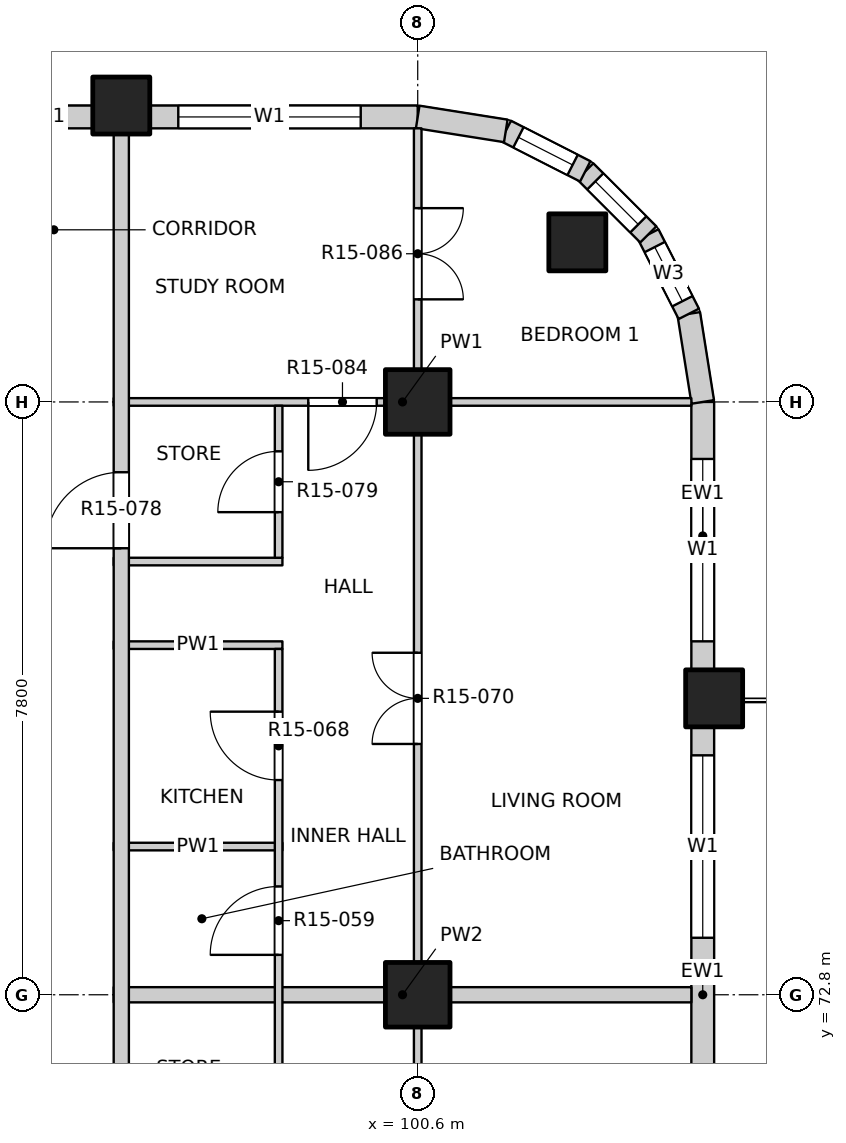
"""IFC4 building model, lengths in metres.
Left out: names, types, materials, properties, quantities, classifications, styles, units other than length and angle.
Written with IfcOpenShell. Run it as: python <this file> out.ifc"""

import sys

from ifc_helpers import new_model, si_unit, direction, frame, frame_2d, origin, origin_2d, place, context, subcontext, project, spatial, rectangle, extrude, element, fill, save


model = new_model("IFC4")
c1 = context("Model", 3, precision=1e-05, world=origin(), true_north=direction((0.0, 1.0)))
c2 = subcontext(c1, "Body", "Model", "MODEL_VIEW")
j1 = project(units=[si_unit("LENGTHUNIT", "METRE"), si_unit("PLANEANGLEUNIT", "RADIAN")], contexts=[c1])
p1 = place(None, origin())
s1 = spatial("IfcSite", under=j1, at=p1, CompositionType="ELEMENT")
p2 = place(p1, origin())
s2 = spatial("IfcBuilding", under=s1, at=p2, CompositionType="ELEMENT")
p3 = place(p2, frame((0.0, 0.0, 158.8)))
s3 = spatial("IfcBuildingStorey", under=s2, at=p3, CompositionType="ELEMENT", Elevation=158.8)
for number, where, z_axis, x_axis in (
    (1, (102.7, 82.7, -0.25), (0.0, 0.0, 1.0), (1.0, 0.0, 0.0)),
    (2, (104.5, 76.7, -0.25), (0.0, 0.0, 1.0), (1.0, 0.0, 0.0)),
    (3, (96.7, 84.5, -0.25), (0.0, 0.0, 1.0), (1.0, 0.0, 0.0)),
):
    element("IfcColumn", number, at=place(p3, frame(where, z_axis=z_axis, x_axis=x_axis)), inside=s3, PredefinedType="COLUMN", context=c2, shape_type="SweptSolid", body=[
        extrude(rectangle(XDim=0.75, YDim=0.75, at=origin_2d()), origin(), (0.0, 0.0, 1.0), 3.4),
    ])
for number, where, z_axis, x_axis in (
    (4, (100.6, 72.8, -0.25), (0.0, 0.0, 1.0), (1.0, 0.0, 0.0)),
    (5, (100.6, 80.6, -0.25), (0.0, 0.0, 1.0), (1.0, 0.0, 0.0)),
):
    element("IfcColumn", number, at=place(p3, frame(where, z_axis=z_axis, x_axis=x_axis)), inside=s3, PredefinedType="COLUMN", context=c2, shape_type="SweptSolid", body=[
        extrude(rectangle(XDim=0.85, YDim=0.85, at=origin_2d()), origin(), (0.0, 0.0, 1.0), 3.4),
    ])
p4 = place(p3, frame((104.35, 69.275, 0.0), z_axis=(0.0, 0.0, 1.0), x_axis=(0.0, 1.0, 0.0)))
e6 = element("IfcWall", 6, at=p4, inside=s3, PredefinedType="SOLIDWALL", context=c2, shape_type="SweptSolid", body=[
    extrude(rectangle(XDim=7.05, YDim=0.3, at=frame_2d((3.525, 0.0))), origin(), (0.0, 0.0, 1.0), 2.7),
])
p5 = place(p4, frame((0.675, 0.0, 0.0)))
e7 = element("IfcOpeningElement", 7, at=p5, cuts=e6, PredefinedType="OPENING", context=c2, shape_type="SweptSolid", body=[
    extrude(rectangle(XDim=1.8, YDim=2.4, at=frame_2d((0.9, 1.2))), frame((0.0, 0.16, 0.0), z_axis=(0.0, -1.0, 0.0), x_axis=(1.0, 0.0, 0.0)), (0.0, 0.0, 1.0), 0.32),
])
p6 = place(p4, frame((4.275, 0.0, 0.9)))
e8 = element("IfcOpeningElement", 8, at=p6, cuts=e6, PredefinedType="OPENING", context=c2, shape_type="SweptSolid", body=[
    extrude(rectangle(XDim=2.4, YDim=1.8, at=frame_2d((1.2, 0.9))), frame((0.0, 0.16, 0.0), z_axis=(0.0, -1.0, 0.0), x_axis=(1.0, 0.0, 0.0)), (0.0, 0.0, 1.0), 0.32),
])
p7 = place(p3, frame((104.35, 77.075, 0.0), z_axis=(0.0, 0.0, 1.0), x_axis=(0.0, 1.0, 0.0)))
e9 = element("IfcWall", 9, at=p7, inside=s3, PredefinedType="SOLIDWALL", context=c2, shape_type="SweptSolid", body=[
    extrude(rectangle(XDim=3.525, YDim=0.3, at=frame_2d((1.763, 0.0))), origin(), (0.0, 0.0, 1.0), 2.7),
])
p8 = place(p7, frame((0.375, 0.0, 0.9)))
e10 = element("IfcOpeningElement", 10, at=p8, cuts=e9, PredefinedType="OPENING", context=c2, shape_type="SweptSolid", body=[
    extrude(rectangle(XDim=2.4, YDim=1.8, at=frame_2d((1.2, 0.9))), frame((0.0, 0.16, 0.0), z_axis=(0.0, -1.0, 0.0), x_axis=(1.0, 0.0, 0.0)), (0.0, 0.0, 1.0), 0.32),
])
p9 = place(p3, frame((95.025, 84.35, 0.0), z_axis=(0.0, 0.0, 1.0), x_axis=(1.0, 0.0, 0.0)))
e11 = element("IfcWall", 11, at=p9, inside=s3, PredefinedType="SOLIDWALL", context=c2, shape_type="SweptSolid", body=[
    extrude(rectangle(XDim=1.3, YDim=0.3, at=frame_2d((0.65, 0.0))), origin(), (0.0, 0.0, 1.0), 2.7),
])
p10 = place(p3, frame((97.075, 84.35, 0.0), z_axis=(0.0, 0.0, 1.0), x_axis=(1.0, 0.0, 0.0)))
e12 = element("IfcWall", 12, at=p10, inside=s3, PredefinedType="SOLIDWALL", context=c2, shape_type="SweptSolid", body=[
    extrude(rectangle(XDim=3.525, YDim=0.3, at=frame_2d((1.763, 0.0))), origin(), (0.0, 0.0, 1.0), 2.7),
])
p11 = place(p10, frame((0.375, 0.0, 0.9)))
e13 = element("IfcOpeningElement", 13, at=p11, cuts=e12, PredefinedType="OPENING", context=c2, shape_type="SweptSolid", body=[
    extrude(rectangle(XDim=2.4, YDim=1.8, at=frame_2d((1.2, 0.9))), frame((0.0, 0.16, 0.0), z_axis=(0.0, -1.0, 0.0), x_axis=(1.0, 0.0, 0.0)), (0.0, 0.0, 1.0), 0.32),
])
p12 = place(p3, frame((104.35, 80.6, 0.0), z_axis=(0.0, 0.0, 1.0), x_axis=(-0.156496880861, 0.987678452879, 0.0)))
e14 = element("IfcWall", 14, at=p12, inside=s3, PredefinedType="SOLIDWALL", context=c2, shape_type="SweptSolid", body=[
    extrude(rectangle(XDim=1.173, YDim=0.3, at=frame_2d((0.586, 0.0))), origin(), (0.0, 0.0, 1.0), 2.7),
])
p13 = place(p3, frame((104.167, 81.759, 0.0), z_axis=(0.0, 0.0, 1.0), x_axis=(-0.454025524128, 0.890988677504, 0.0)))
e15 = element("IfcWall", 15, at=p13, inside=s3, PredefinedType="SOLIDWALL", context=c2, shape_type="SweptSolid", body=[
    extrude(rectangle(XDim=1.173, YDim=0.3, at=frame_2d((0.587, 0.0))), origin(), (0.0, 0.0, 1.0), 2.7),
])
p14 = place(p13, frame((0.187, 0.0, 0.9)))
e16 = element("IfcOpeningElement", 16, at=p14, cuts=e15, PredefinedType="OPENING", context=c2, shape_type="SweptSolid", body=[
    extrude(rectangle(XDim=0.8, YDim=1.2, at=frame_2d((0.4, 0.6))), frame((0.0, 0.16, 0.0), z_axis=(0.0, -1.0, 0.0), x_axis=(1.0, 0.0, 0.0)), (0.0, 0.0, 1.0), 0.32),
])
p15 = place(p3, frame((103.634, 82.804, 0.0), z_axis=(0.0, 0.0, 1.0), x_axis=(-0.707106781187, 0.707106781187, 0.0)))
e17 = element("IfcWall", 17, at=p15, inside=s3, PredefinedType="SOLIDWALL", context=c2, shape_type="SweptSolid", body=[
    extrude(rectangle(XDim=1.173, YDim=0.3, at=frame_2d((0.586, 0.0))), origin(), (0.0, 0.0, 1.0), 2.7),
])
p16 = place(p15, frame((0.187, 0.0, 0.9)))
e18 = element("IfcOpeningElement", 18, at=p16, cuts=e17, PredefinedType="OPENING", context=c2, shape_type="SweptSolid", body=[
    extrude(rectangle(XDim=0.8, YDim=1.2, at=frame_2d((0.4, 0.6))), frame((0.0, 0.16, 0.0), z_axis=(0.0, -1.0, 0.0), x_axis=(1.0, 0.0, 0.0)), (0.0, 0.0, 1.0), 0.32),
])
p17 = place(p3, frame((102.804, 83.634, 0.0), z_axis=(0.0, 0.0, 1.0), x_axis=(-0.890988677504, 0.454025524128, 0.0)))
e19 = element("IfcWall", 19, at=p17, inside=s3, PredefinedType="SOLIDWALL", context=c2, shape_type="SweptSolid", body=[
    extrude(rectangle(XDim=1.173, YDim=0.3, at=frame_2d((0.587, 0.0))), origin(), (0.0, 0.0, 1.0), 2.7),
])
p18 = place(p17, frame((0.187, 0.0, 0.9)))
e20 = element("IfcOpeningElement", 20, at=p18, cuts=e19, PredefinedType="OPENING", context=c2, shape_type="SweptSolid", body=[
    extrude(rectangle(XDim=0.8, YDim=1.2, at=frame_2d((0.4, 0.6))), frame((0.0, 0.16, 0.0), z_axis=(0.0, -1.0, 0.0), x_axis=(1.0, 0.0, 0.0)), (0.0, 0.0, 1.0), 0.32),
])
p19 = place(p3, frame((101.759, 84.167, 0.0), z_axis=(0.0, 0.0, 1.0), x_axis=(-0.987678452879, 0.156496880861, 0.0)))
e21 = element("IfcWall", 21, at=p19, inside=s3, PredefinedType="SOLIDWALL", context=c2, shape_type="SweptSolid", body=[
    extrude(rectangle(XDim=1.173, YDim=0.3, at=frame_2d((0.586, 0.0))), origin(), (0.0, 0.0, 1.0), 2.7),
])
p20 = place(p3, frame((96.6, 72.8, 0.0), z_axis=(0.0, 0.0, 1.0), x_axis=(1.0, 0.0, 0.0)))
e22 = element("IfcWall", 22, at=p20, inside=s3, PredefinedType="PARTITIONING", context=c2, shape_type="SweptSolid", body=[
    extrude(rectangle(XDim=7.6, YDim=0.2, at=frame_2d((3.8, 0.0))), origin(), (0.0, 0.0, 1.0), 3.15),
])
for number, where, z_axis, x_axis in (
    (23, (96.6, 74.75, 0.0), (0.0, 0.0, 1.0), (1.0, 0.0, 0.0)),
    (24, (96.6, 77.4, 0.0), (0.0, 0.0, 1.0), (1.0, 0.0, 0.0)),
    (25, (96.6, 78.5, 0.0), (0.0, 0.0, 1.0), (1.0, 0.0, 0.0)),
):
    element("IfcWall", number, at=place(p3, frame(where, z_axis=z_axis, x_axis=x_axis)), inside=s3, PredefinedType="PARTITIONING", context=c2, shape_type="SweptSolid", body=[
        extrude(rectangle(XDim=2.22, YDim=0.1, at=frame_2d((1.11, 0.0))), origin(), (0.0, 0.0, 1.0), 3.15),
    ])
p21 = place(p3, frame((96.6, 80.6, 0.0), z_axis=(0.0, 0.0, 1.0), x_axis=(1.0, 0.0, 0.0)))
e26 = element("IfcWall", 26, at=p21, inside=s3, PredefinedType="PARTITIONING", context=c2, shape_type="SweptSolid", body=[
    extrude(rectangle(XDim=7.6, YDim=0.1, at=frame_2d((3.8, 0.0))), origin(), (0.0, 0.0, 1.0), 3.15),
])
p22 = place(p21, frame((2.56, 0.0, 0.0)))
e27 = element("IfcOpeningElement", 27, at=p22, cuts=e26, PredefinedType="OPENING", context=c2, shape_type="SweptSolid", body=[
    extrude(rectangle(XDim=0.9, YDim=2.1, at=frame_2d((0.45, 1.05))), frame((0.0, 0.06, 0.0), z_axis=(0.0, -1.0, 0.0), x_axis=(1.0, 0.0, 0.0)), (0.0, 0.0, 1.0), 0.12),
])
p23 = place(p3, frame((96.7, 49.5, 0.0), z_axis=(0.0, 0.0, 1.0), x_axis=(0.0, 1.0, 0.0)))
e28 = element("IfcWall", 28, at=p23, inside=s3, PredefinedType="PARTITIONING", context=c2, shape_type="SweptSolid", body=[
    extrude(rectangle(XDim=34.7, YDim=0.2, at=frame_2d((17.35, 0.0))), origin(), (0.0, 0.0, 1.0), 3.15),
])
p24 = place(p23, frame((3.875, 0.0, 0.0)))
e29 = element("IfcOpeningElement", 29, at=p24, cuts=e28, PredefinedType="OPENING", context=c2, shape_type="SweptSolid", body=[
    extrude(rectangle(XDim=1.0, YDim=2.1, at=frame_2d((0.5, 1.05))), frame((0.0, 0.11, 0.0), z_axis=(0.0, -1.0, 0.0), x_axis=(1.0, 0.0, 0.0)), (0.0, 0.0, 1.0), 0.22),
])
p25 = place(p23, frame((14.775, 0.0, 0.0)))
e30 = element("IfcOpeningElement", 30, at=p25, cuts=e28, PredefinedType="OPENING", context=c2, shape_type="SweptSolid", body=[
    extrude(rectangle(XDim=1.0, YDim=2.1, at=frame_2d((0.5, 1.05))), frame((0.0, 0.11, 0.0), z_axis=(0.0, -1.0, 0.0), x_axis=(1.0, 0.0, 0.0)), (0.0, 0.0, 1.0), 0.22),
])
p26 = place(p23, frame((29.175, 0.0, 0.0)))
e31 = element("IfcOpeningElement", 31, at=p26, cuts=e28, PredefinedType="OPENING", context=c2, shape_type="SweptSolid", body=[
    extrude(rectangle(XDim=1.0, YDim=2.1, at=frame_2d((0.5, 1.05))), frame((0.0, 0.11, 0.0), z_axis=(0.0, -1.0, 0.0), x_axis=(1.0, 0.0, 0.0)), (0.0, 0.0, 1.0), 0.22),
])
p27 = place(p3, frame((98.77, 64.15, 0.0), z_axis=(0.0, 0.0, 1.0), x_axis=(0.0, 1.0, 0.0)))
e32 = element("IfcWall", 32, at=p27, inside=s3, PredefinedType="PARTITIONING", context=c2, shape_type="SweptSolid", body=[
    extrude(rectangle(XDim=13.2, YDim=0.1, at=frame_2d((6.6, 0.0))), origin(), (0.0, 0.0, 1.0), 3.15),
])
p28 = place(p27, frame((1.185, 0.0, 0.0)))
e33 = element("IfcOpeningElement", 33, at=p28, cuts=e32, PredefinedType="OPENING", context=c2, shape_type="SweptSolid", body=[
    extrude(rectangle(XDim=0.9, YDim=2.1, at=frame_2d((0.45, 1.05))), frame((0.0, 0.06, 0.0), z_axis=(0.0, -1.0, 0.0), x_axis=(1.0, 0.0, 0.0)), (0.0, 0.0, 1.0), 0.12),
])
p29 = place(p27, frame((4.085, 0.0, 0.0)))
e34 = element("IfcOpeningElement", 34, at=p29, cuts=e32, PredefinedType="OPENING", context=c2, shape_type="SweptSolid", body=[
    extrude(rectangle(XDim=0.9, YDim=2.1, at=frame_2d((0.45, 1.05))), frame((0.0, 0.06, 0.0), z_axis=(0.0, -1.0, 0.0), x_axis=(1.0, 0.0, 0.0)), (0.0, 0.0, 1.0), 0.12),
])
p30 = place(p27, frame((6.8, 0.0, 0.0)))
e35 = element("IfcOpeningElement", 35, at=p30, cuts=e32, PredefinedType="OPENING", context=c2, shape_type="SweptSolid", body=[
    extrude(rectangle(XDim=0.8, YDim=2.1, at=frame_2d((0.4, 1.05))), frame((0.0, 0.06, 0.0), z_axis=(0.0, -1.0, 0.0), x_axis=(1.0, 0.0, 0.0)), (0.0, 0.0, 1.0), 0.12),
])
p31 = place(p27, frame((9.175, 0.0, 0.0)))
e36 = element("IfcOpeningElement", 36, at=p31, cuts=e32, PredefinedType="OPENING", context=c2, shape_type="SweptSolid", body=[
    extrude(rectangle(XDim=0.9, YDim=2.1, at=frame_2d((0.45, 1.05))), frame((0.0, 0.06, 0.0), z_axis=(0.0, -1.0, 0.0), x_axis=(1.0, 0.0, 0.0)), (0.0, 0.0, 1.0), 0.12),
])
p32 = place(p27, frame((11.475, 0.0, 0.0)))
e37 = element("IfcOpeningElement", 37, at=p32, cuts=e32, PredefinedType="OPENING", context=c2, shape_type="SweptSolid", body=[
    extrude(rectangle(XDim=0.9, YDim=2.1, at=frame_2d((0.45, 1.05))), frame((0.0, 0.06, 0.0), z_axis=(0.0, -1.0, 0.0), x_axis=(1.0, 0.0, 0.0)), (0.0, 0.0, 1.0), 0.12),
])
p33 = place(p3, frame((98.77, 78.55, 0.0), z_axis=(0.0, 0.0, 1.0), x_axis=(0.0, 1.0, 0.0)))
e38 = element("IfcWall", 38, at=p33, inside=s3, PredefinedType="PARTITIONING", context=c2, shape_type="SweptSolid", body=[
    extrude(rectangle(XDim=2.0, YDim=0.1, at=frame_2d((1.0, 0.0))), origin(), (0.0, 0.0, 1.0), 3.15),
])
p34 = place(p33, frame((0.6, 0.0, 0.0)))
e39 = element("IfcOpeningElement", 39, at=p34, cuts=e38, PredefinedType="OPENING", context=c2, shape_type="SweptSolid", body=[
    extrude(rectangle(XDim=0.8, YDim=2.1, at=frame_2d((0.4, 1.05))), frame((0.0, 0.06, 0.0), z_axis=(0.0, -1.0, 0.0), x_axis=(1.0, 0.0, 0.0)), (0.0, 0.0, 1.0), 0.12),
])
p35 = place(p3, frame((100.6, 45.8, 0.0), z_axis=(0.0, 0.0, 1.0), x_axis=(0.0, 1.0, 0.0)))
e40 = element("IfcWall", 40, at=p35, inside=s3, PredefinedType="PARTITIONING", context=c2, shape_type="SweptSolid", body=[
    extrude(rectangle(XDim=38.4, YDim=0.1, at=frame_2d((19.2, 0.0))), origin(), (0.0, 0.0, 1.0), 3.15),
])
p36 = place(p35, frame((1.05, 0.0, 0.0)))
e41 = element("IfcOpeningElement", 41, at=p36, cuts=e40, PredefinedType="OPENING", context=c2, shape_type="SweptSolid", body=[
    extrude(rectangle(XDim=1.2, YDim=2.1, at=frame_2d((0.6, 1.05))), frame((0.0, 0.06, 0.0), z_axis=(0.0, -1.0, 0.0), x_axis=(1.0, 0.0, 0.0)), (0.0, 0.0, 1.0), 0.12),
])
p37 = place(p35, frame((5.1, 0.0, 0.0)))
e42 = element("IfcOpeningElement", 42, at=p37, cuts=e40, PredefinedType="OPENING", context=c2, shape_type="SweptSolid", body=[
    extrude(rectangle(XDim=0.9, YDim=2.1, at=frame_2d((0.45, 1.05))), frame((0.0, 0.06, 0.0), z_axis=(0.0, -1.0, 0.0), x_axis=(1.0, 0.0, 0.0)), (0.0, 0.0, 1.0), 0.12),
])
p38 = place(p35, frame((9.0, 0.0, 0.0)))
e43 = element("IfcOpeningElement", 43, at=p38, cuts=e40, PredefinedType="OPENING", context=c2, shape_type="SweptSolid", body=[
    extrude(rectangle(XDim=0.9, YDim=2.1, at=frame_2d((0.45, 1.05))), frame((0.0, 0.06, 0.0), z_axis=(0.0, -1.0, 0.0), x_axis=(1.0, 0.0, 0.0)), (0.0, 0.0, 1.0), 0.12),
])
p39 = place(p35, frame((12.9, 0.0, 0.0)))
e44 = element("IfcOpeningElement", 44, at=p39, cuts=e40, PredefinedType="OPENING", context=c2, shape_type="SweptSolid", body=[
    extrude(rectangle(XDim=0.9, YDim=2.1, at=frame_2d((0.45, 1.05))), frame((0.0, 0.06, 0.0), z_axis=(0.0, -1.0, 0.0), x_axis=(1.0, 0.0, 0.0)), (0.0, 0.0, 1.0), 0.12),
])
p40 = place(p35, frame((19.725, 0.0, 0.0)))
e45 = element("IfcOpeningElement", 45, at=p40, cuts=e40, PredefinedType="OPENING", context=c2, shape_type="SweptSolid", body=[
    extrude(rectangle(XDim=1.2, YDim=2.1, at=frame_2d((0.6, 1.05))), frame((0.0, 0.06, 0.0), z_axis=(0.0, -1.0, 0.0), x_axis=(1.0, 0.0, 0.0)), (0.0, 0.0, 1.0), 0.12),
])
p41 = place(p35, frame((24.6, 0.0, 0.0)))
e46 = element("IfcOpeningElement", 46, at=p41, cuts=e40, PredefinedType="OPENING", context=c2, shape_type="SweptSolid", body=[
    extrude(rectangle(XDim=0.9, YDim=2.1, at=frame_2d((0.45, 1.05))), frame((0.0, 0.06, 0.0), z_axis=(0.0, -1.0, 0.0), x_axis=(1.0, 0.0, 0.0)), (0.0, 0.0, 1.0), 0.12),
])
p42 = place(p35, frame((30.3, 0.0, 0.0)))
e47 = element("IfcOpeningElement", 47, at=p42, cuts=e40, PredefinedType="OPENING", context=c2, shape_type="SweptSolid", body=[
    extrude(rectangle(XDim=1.2, YDim=2.1, at=frame_2d((0.6, 1.05))), frame((0.0, 0.06, 0.0), z_axis=(0.0, -1.0, 0.0), x_axis=(1.0, 0.0, 0.0)), (0.0, 0.0, 1.0), 0.12),
])
p43 = place(p35, frame((36.15, 0.0, 0.0)))
e48 = element("IfcOpeningElement", 48, at=p43, cuts=e40, PredefinedType="OPENING", context=c2, shape_type="SweptSolid", body=[
    extrude(rectangle(XDim=1.2, YDim=2.1, at=frame_2d((0.6, 1.05))), frame((0.0, 0.06, 0.0), z_axis=(0.0, -1.0, 0.0), x_axis=(1.0, 0.0, 0.0)), (0.0, 0.0, 1.0), 0.12),
])
p44 = place(p6, origin())
e49 = element("IfcWindow", 49, at=p44, inside=s3, PartitioningType="DOUBLE_PANEL_VERTICAL", PredefinedType="WINDOW", context=c2, shape_type="SweptSolid", body=[
    extrude(rectangle(XDim=2.4, YDim=1.8, at=frame_2d((1.2, 0.9))), frame((0.0, 0.03, 0.0), z_axis=(0.0, -1.0, 0.0), x_axis=(1.0, 0.0, 0.0)), (0.0, 0.0, 1.0), 0.06),
])
fill(e8, e49)
p45 = place(p8, origin())
e50 = element("IfcWindow", 50, at=p45, inside=s3, PartitioningType="DOUBLE_PANEL_VERTICAL", PredefinedType="WINDOW", context=c2, shape_type="SweptSolid", body=[
    extrude(rectangle(XDim=2.4, YDim=1.8, at=frame_2d((1.2, 0.9))), frame((0.0, 0.03, 0.0), z_axis=(0.0, -1.0, 0.0), x_axis=(1.0, 0.0, 0.0)), (0.0, 0.0, 1.0), 0.06),
])
fill(e10, e50)
p46 = place(p11, origin())
e51 = element("IfcWindow", 51, at=p46, inside=s3, PartitioningType="DOUBLE_PANEL_VERTICAL", PredefinedType="WINDOW", context=c2, shape_type="SweptSolid", body=[
    extrude(rectangle(XDim=2.4, YDim=1.8, at=frame_2d((1.2, 0.9))), frame((0.0, 0.03, 0.0), z_axis=(0.0, -1.0, 0.0), x_axis=(1.0, 0.0, 0.0)), (0.0, 0.0, 1.0), 0.06),
])
fill(e13, e51)
p47 = place(p14, origin())
e52 = element("IfcWindow", 52, at=p47, inside=s3, PartitioningType="SINGLE_PANEL", PredefinedType="WINDOW", context=c2, shape_type="SweptSolid", body=[
    extrude(rectangle(XDim=0.8, YDim=1.2, at=frame_2d((0.4, 0.6))), frame((0.0, 0.03, 0.0), z_axis=(0.0, -1.0, 0.0), x_axis=(1.0, 0.0, 0.0)), (0.0, 0.0, 1.0), 0.06),
])
fill(e16, e52)
p48 = place(p16, origin())
e53 = element("IfcWindow", 53, at=p48, inside=s3, PartitioningType="SINGLE_PANEL", PredefinedType="WINDOW", context=c2, shape_type="SweptSolid", body=[
    extrude(rectangle(XDim=0.8, YDim=1.2, at=frame_2d((0.4, 0.6))), frame((0.0, 0.03, 0.0), z_axis=(0.0, -1.0, 0.0), x_axis=(1.0, 0.0, 0.0)), (0.0, 0.0, 1.0), 0.06),
])
fill(e18, e53)
p49 = place(p18, origin())
e54 = element("IfcWindow", 54, at=p49, inside=s3, PartitioningType="SINGLE_PANEL", PredefinedType="WINDOW", context=c2, shape_type="SweptSolid", body=[
    extrude(rectangle(XDim=0.8, YDim=1.2, at=frame_2d((0.4, 0.6))), frame((0.0, 0.03, 0.0), z_axis=(0.0, -1.0, 0.0), x_axis=(1.0, 0.0, 0.0)), (0.0, 0.0, 1.0), 0.06),
])
fill(e20, e54)
p50 = place(p31, origin())
e55 = element("IfcDoor", 55, at=p50, inside=s3, OperationType="SINGLE_SWING_LEFT", PredefinedType="DOOR", context=c2, shape_type="SweptSolid", body=[
    extrude(rectangle(XDim=0.9, YDim=2.1, at=frame_2d((0.45, 1.05))), frame((0.0, 0.025, 0.0), z_axis=(0.0, -1.0, 0.0), x_axis=(1.0, 0.0, 0.0)), (0.0, 0.0, 1.0), 0.05),
])
fill(e36, e55)
p51 = place(p32, origin())
e56 = element("IfcDoor", 56, at=p51, inside=s3, OperationType="SINGLE_SWING_RIGHT", PredefinedType="DOOR", context=c2, shape_type="SweptSolid", body=[
    extrude(rectangle(XDim=0.9, YDim=2.1, at=frame_2d((0.45, 1.05))), frame((0.0, 0.025, 0.0), z_axis=(0.0, -1.0, 0.0), x_axis=(1.0, 0.0, 0.0)), (0.0, 0.0, 1.0), 0.05),
])
fill(e37, e56)
p52 = place(p42, origin())
e57 = element("IfcDoor", 57, at=p52, inside=s3, OperationType="DOUBLE_DOOR_SINGLE_SWING", PredefinedType="DOOR", context=c2, shape_type="SweptSolid", body=[
    extrude(rectangle(XDim=1.2, YDim=2.1, at=frame_2d((0.6, 1.05))), frame((0.0, 0.025, 0.0), z_axis=(0.0, -1.0, 0.0), x_axis=(1.0, 0.0, 0.0)), (0.0, 0.0, 1.0), 0.05),
])
fill(e47, e57)
p53 = place(p26, origin())
e58 = element("IfcDoor", 58, at=p53, inside=s3, OperationType="SINGLE_SWING_LEFT", PredefinedType="DOOR", context=c2, shape_type="SweptSolid", body=[
    extrude(rectangle(XDim=1.0, YDim=2.1, at=frame_2d((0.5, 1.05))), frame((0.0, 0.025, 0.0), z_axis=(0.0, -1.0, 0.0), x_axis=(1.0, 0.0, 0.0)), (0.0, 0.0, 1.0), 0.05),
])
fill(e31, e58)
p54 = place(p34, origin())
e59 = element("IfcDoor", 59, at=p54, inside=s3, OperationType="SINGLE_SWING_LEFT", PredefinedType="DOOR", context=c2, shape_type="SweptSolid", body=[
    extrude(rectangle(XDim=0.8, YDim=2.1, at=frame_2d((0.4, 1.05))), frame((0.0, 0.025, 0.0), z_axis=(0.0, -1.0, 0.0), x_axis=(1.0, 0.0, 0.0)), (0.0, 0.0, 1.0), 0.05),
])
fill(e39, e59)
p55 = place(p22, origin())
e60 = element("IfcDoor", 60, at=p55, inside=s3, OperationType="SINGLE_SWING_RIGHT", PredefinedType="DOOR", context=c2, shape_type="SweptSolid", body=[
    extrude(rectangle(XDim=0.9, YDim=2.1, at=frame_2d((0.45, 1.05))), frame((0.0, 0.025, 0.0), z_axis=(0.0, -1.0, 0.0), x_axis=(1.0, 0.0, 0.0)), (0.0, 0.0, 1.0), 0.05),
])
fill(e27, e60)
p56 = place(p43, origin())
e61 = element("IfcDoor", 61, at=p56, inside=s3, OperationType="DOUBLE_DOOR_SINGLE_SWING", PredefinedType="DOOR", context=c2, shape_type="SweptSolid", body=[
    extrude(rectangle(XDim=1.2, YDim=2.1, at=frame_2d((0.6, 1.05))), frame((0.0, 0.025, 0.0), z_axis=(0.0, -1.0, 0.0), x_axis=(1.0, 0.0, 0.0)), (0.0, 0.0, 1.0), 0.05),
])
fill(e48, e61)
save(model, sys.argv[1])
